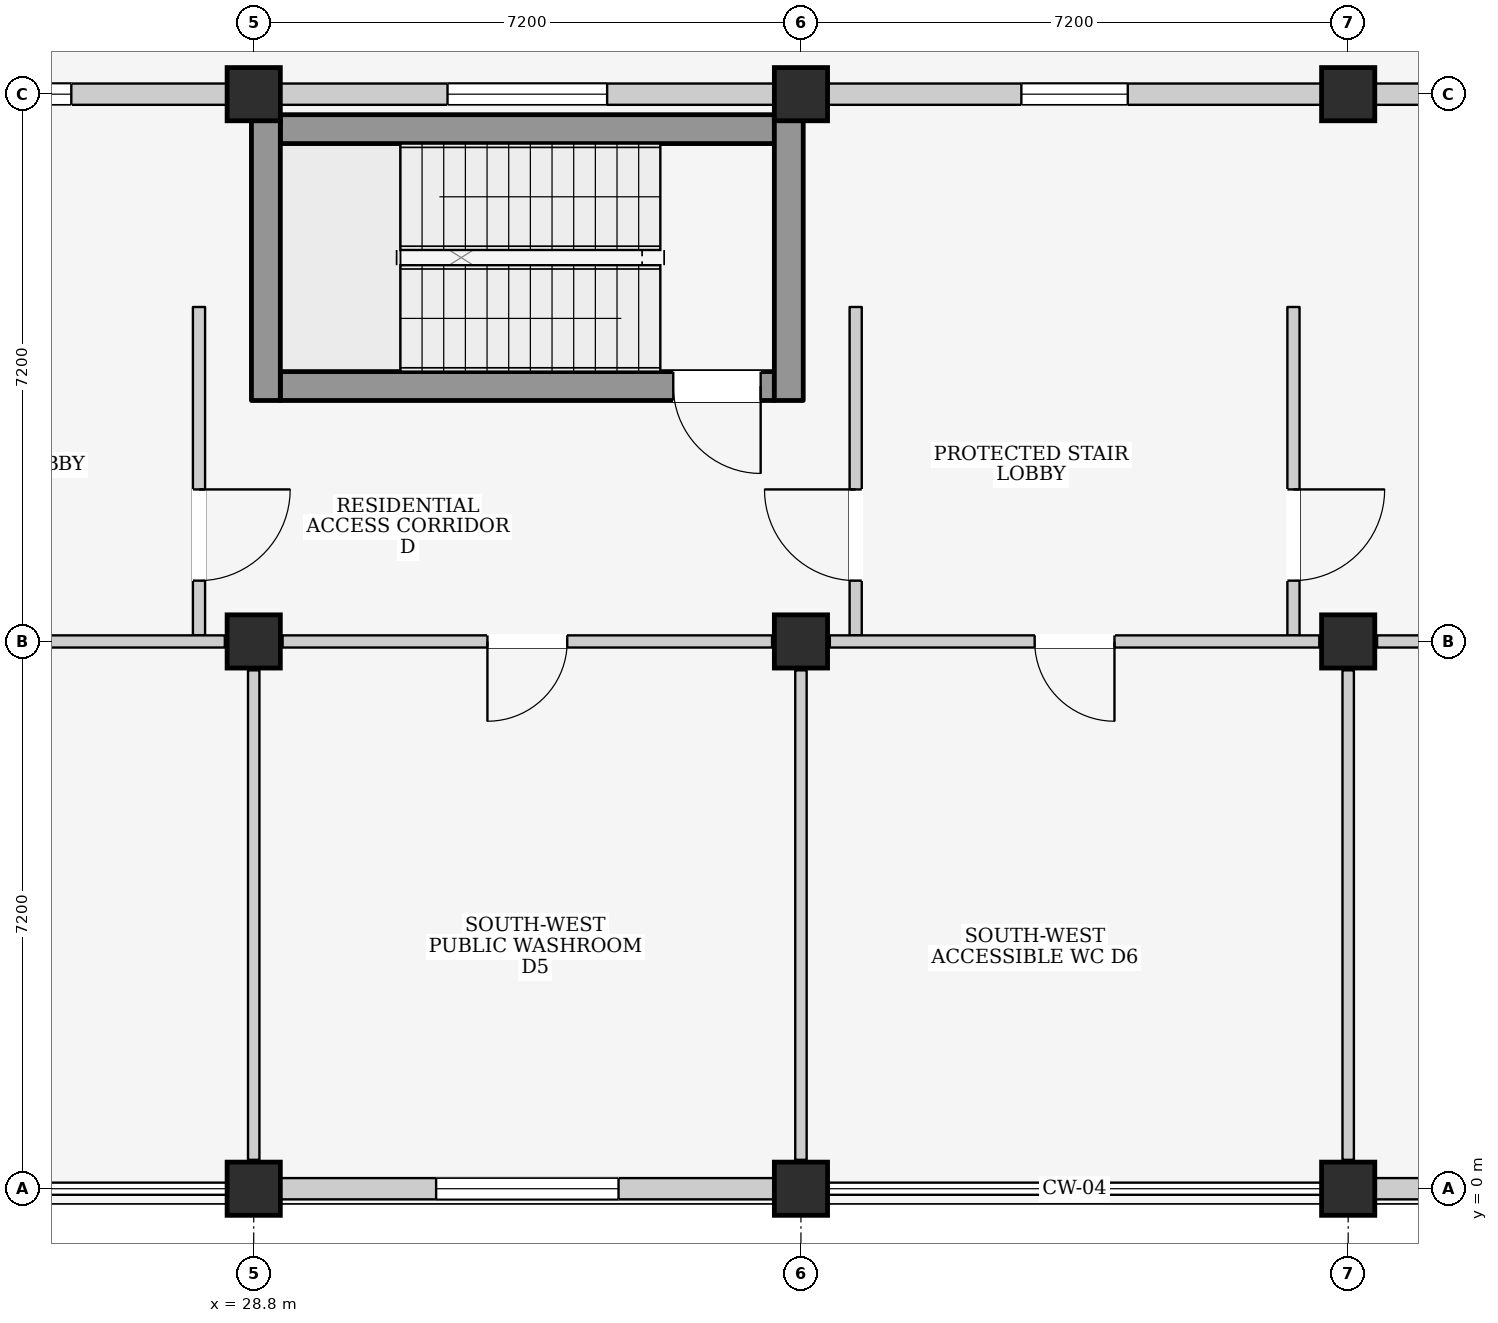
"""IFC4 building model, lengths in metres.
Left out: names, types, materials, properties, quantities, classifications, styles, units other than length and angle.
Written with IfcOpenShell. Run it as: python <this file> out.ifc"""

import sys

from ifc_helpers import new_model, si_unit, direction, frame, frame_2d, origin, origin_2d, place, context, subcontext, project, spatial, rectangle, extrude, element, fill, save


model = new_model("IFC4")
c1 = context("Model", 3, precision=1e-05, world=origin(), true_north=direction((0.0, 1.0)))
c2 = subcontext(c1, "Body", "Model", "MODEL_VIEW")
j1 = project(units=[si_unit("LENGTHUNIT", "METRE"), si_unit("PLANEANGLEUNIT", "RADIAN")], contexts=[c1])
p1 = place(None, origin())
s1 = spatial("IfcSite", under=j1, at=p1, CompositionType="ELEMENT")
p2 = place(p1, origin())
s2 = spatial("IfcBuilding", under=s1, at=p2, CompositionType="ELEMENT")
p3 = place(p2, origin())
s3 = spatial("IfcBuildingStorey", under=s2, at=p3, CompositionType="ELEMENT", Elevation=0.0)
for number, where, z_axis, x_axis in (
    (1, (28.8, 0.0, 0.0), (0.0, 0.0, 1.0), (1.0, 0.0, 0.0)),
    (2, (28.8, 7.2, 0.0), (0.0, 0.0, 1.0), (1.0, 0.0, 0.0)),
    (3, (28.8, 14.4, 0.0), (0.0, 0.0, 1.0), (1.0, 0.0, 0.0)),
    (4, (36.0, 0.0, 0.0), (0.0, 0.0, 1.0), (1.0, 0.0, 0.0)),
    (5, (36.0, 7.2, 0.0), (0.0, 0.0, 1.0), (1.0, 0.0, 0.0)),
    (6, (36.0, 14.4, 0.0), (0.0, 0.0, 1.0), (1.0, 0.0, 0.0)),
    (7, (43.2, 0.0, 0.0), (0.0, 0.0, 1.0), (1.0, 0.0, 0.0)),
    (8, (43.2, 7.2, 0.0), (0.0, 0.0, 1.0), (1.0, 0.0, 0.0)),
    (9, (43.2, 14.4, 0.0), (0.0, 0.0, 1.0), (1.0, 0.0, 0.0)),
):
    element("IfcColumn", number, at=place(p3, frame(where, z_axis=z_axis, x_axis=x_axis)), inside=s3, PredefinedType="COLUMN", context=c2, shape_type="SweptSolid", body=[
        extrude(rectangle(XDim=0.7, YDim=0.7, at=origin_2d()), origin(), (0.0, 0.0, 1.0), 4.5),
    ])
p4 = place(p3, frame((21.95, 14.4, 0.0), z_axis=(0.0, 0.0, 1.0), x_axis=(1.0, 0.0, 0.0)))
e10 = element("IfcWall", 10, at=p4, inside=s3, PredefinedType="ELEMENTEDWALL", context=c2, shape_type="SweptSolid", body=[
    extrude(rectangle(XDim=6.5, YDim=0.28, at=frame_2d((3.25, 0.0))), origin(), (0.0, 0.0, 1.0), 3.435),
])
p5 = place(p4, frame((2.05, 0.0, 0.95)))
e11 = element("IfcOpeningElement", 11, at=p5, cuts=e10, PredefinedType="OPENING", context=c2, shape_type="SweptSolid", body=[
    extrude(rectangle(XDim=2.4, YDim=1.65, at=frame_2d((1.2, 0.825))), frame((0.0, 0.155, 0.0), z_axis=(0.0, -1.0, 0.0), x_axis=(1.0, 0.0, 0.0)), (0.0, 0.0, 1.0), 0.31),
])
p6 = place(p3, frame((29.15, 0.0, 0.0), z_axis=(0.0, 0.0, 1.0), x_axis=(1.0, 0.0, 0.0)))
e12 = element("IfcWall", 12, at=p6, inside=s3, PredefinedType="ELEMENTEDWALL", context=c2, shape_type="SweptSolid", body=[
    extrude(rectangle(XDim=6.5, YDim=0.28, at=frame_2d((3.25, 0.0))), origin(), (0.0, 0.0, 1.0), 3.665),
])
p7 = place(p6, frame((2.05, 0.0, 0.95)))
e13 = element("IfcOpeningElement", 13, at=p7, cuts=e12, PredefinedType="OPENING", context=c2, shape_type="SweptSolid", body=[
    extrude(rectangle(XDim=2.4, YDim=1.65, at=frame_2d((1.2, 0.825))), frame((0.0, 0.155, 0.0), z_axis=(0.0, -1.0, 0.0), x_axis=(1.0, 0.0, 0.0)), (0.0, 0.0, 1.0), 0.31),
])
p8 = place(p3, frame((29.15, 14.4, 0.0), z_axis=(0.0, 0.0, 1.0), x_axis=(1.0, 0.0, 0.0)))
e14 = element("IfcWall", 14, at=p8, inside=s3, PredefinedType="ELEMENTEDWALL", context=c2, shape_type="SweptSolid", body=[
    extrude(rectangle(XDim=6.5, YDim=0.28, at=frame_2d((3.25, 0.0))), origin(), (0.0, 0.0, 1.0), 3.435),
])
p9 = place(p8, frame((2.2, 0.0, 0.95)))
e15 = element("IfcOpeningElement", 15, at=p9, cuts=e14, PredefinedType="OPENING", context=c2, shape_type="SweptSolid", body=[
    extrude(rectangle(XDim=2.1, YDim=1.65, at=frame_2d((1.05, 0.825))), frame((0.0, 0.155, 0.0), z_axis=(0.0, -1.0, 0.0), x_axis=(1.0, 0.0, 0.0)), (0.0, 0.0, 1.0), 0.31),
])
p10 = place(p3, frame((36.35, 14.4, 0.0), z_axis=(0.0, 0.0, 1.0), x_axis=(1.0, 0.0, 0.0)))
e16 = element("IfcWall", 16, at=p10, inside=s3, PredefinedType="ELEMENTEDWALL", context=c2, shape_type="SweptSolid", body=[
    extrude(rectangle(XDim=6.5, YDim=0.28, at=frame_2d((3.25, 0.0))), origin(), (0.0, 0.0, 1.0), 3.435),
])
p11 = place(p10, frame((2.55, 0.0, 0.95)))
e17 = element("IfcOpeningElement", 17, at=p11, cuts=e16, PredefinedType="OPENING", context=c2, shape_type="SweptSolid", body=[
    extrude(rectangle(XDim=1.4, YDim=1.2, at=frame_2d((0.7, 0.6))), frame((0.0, 0.155, 0.0), z_axis=(0.0, -1.0, 0.0), x_axis=(1.0, 0.0, 0.0)), (0.0, 0.0, 1.0), 0.31),
])
p12 = place(p3, frame((43.55, 0.0, 0.0), z_axis=(0.0, 0.0, 1.0), x_axis=(1.0, 0.0, 0.0)))
e18 = element("IfcWall", 18, at=p12, inside=s3, PredefinedType="ELEMENTEDWALL", context=c2, shape_type="SweptSolid", body=[
    extrude(rectangle(XDim=6.5, YDim=0.28, at=frame_2d((3.25, 0.0))), origin(), (0.0, 0.0, 1.0), 3.665),
])
p13 = place(p12, frame((1.2, 0.0, 0.0)))
e19 = element("IfcOpeningElement", 19, at=p13, cuts=e18, PredefinedType="OPENING", context=c2, shape_type="SweptSolid", body=[
    extrude(rectangle(XDim=1.1, YDim=2.2, at=frame_2d((0.55, 1.1))), frame((0.0, 0.155, 0.0), z_axis=(0.0, -1.0, 0.0), x_axis=(1.0, 0.0, 0.0)), (0.0, 0.0, 1.0), 0.31),
])
p14 = place(p12, frame((2.9, 0.0, 0.85)))
e20 = element("IfcOpeningElement", 20, at=p14, cuts=e18, PredefinedType="OPENING", context=c2, shape_type="SweptSolid", body=[
    extrude(rectangle(XDim=2.2, YDim=1.8, at=frame_2d((1.1, 0.9))), frame((0.0, 0.155, 0.0), z_axis=(0.0, -1.0, 0.0), x_axis=(1.0, 0.0, 0.0)), (0.0, 0.0, 1.0), 0.31),
])
p15 = place(p3, frame((43.55, 14.4, 0.0), z_axis=(0.0, 0.0, 1.0), x_axis=(1.0, 0.0, 0.0)))
e21 = element("IfcWall", 21, at=p15, inside=s3, PredefinedType="ELEMENTEDWALL", context=c2, shape_type="SweptSolid", body=[
    extrude(rectangle(XDim=6.5, YDim=0.28, at=frame_2d((3.25, 0.0))), origin(), (0.0, 0.0, 1.0), 3.435),
])
p16 = place(p15, frame((2.6, 0.0, 0.0)))
e22 = element("IfcOpeningElement", 22, at=p16, cuts=e21, PredefinedType="OPENING", context=c2, shape_type="SweptSolid", body=[
    extrude(rectangle(XDim=1.2, YDim=2.15, at=frame_2d((0.6, 1.075))), frame((0.0, 0.155, 0.0), z_axis=(0.0, -1.0, 0.0), x_axis=(1.0, 0.0, 0.0)), (0.0, 0.0, 1.0), 0.31),
])
p17 = place(p3, frame((28.08, 7.28, 0.0), z_axis=(0.0, 0.0, 1.0), x_axis=(0.0, 1.0, 0.0)))
e23 = element("IfcWall", 23, at=p17, inside=s3, PredefinedType="PARTITIONING", context=c2, shape_type="SweptSolid", body=[
    extrude(rectangle(XDim=4.32, YDim=0.16, at=frame_2d((2.16, 0.0))), origin(), (0.0, 0.0, 1.0), 4.2),
])
p18 = place(p17, frame((0.72, 0.0, 0.0)))
e24 = element("IfcOpeningElement", 24, at=p18, cuts=e23, PredefinedType="OPENING", context=c2, shape_type="SweptSolid", body=[
    extrude(rectangle(XDim=1.2, YDim=2.2, at=frame_2d((0.6, 1.1))), frame((0.0, 0.095, 0.0), z_axis=(0.0, -1.0, 0.0), x_axis=(1.0, 0.0, 0.0)), (0.0, 0.0, 1.0), 0.19),
])
p19 = place(p3, frame((29.15, 10.56, 0.0), z_axis=(0.0, 0.0, 1.0), x_axis=(1.0, 0.0, 0.0)))
e25 = element("IfcWall", 25, at=p19, inside=s3, PredefinedType="SHEAR", context=c2, shape_type="SweptSolid", body=[
    extrude(rectangle(XDim=6.5, YDim=0.38, at=frame_2d((3.25, 0.0))), origin(), (0.0, 0.0, 1.0), 4.2),
])
p20 = place(p19, frame((5.17, 0.0, 0.0)))
e26 = element("IfcOpeningElement", 26, at=p20, cuts=e25, PredefinedType="OPENING", context=c2, shape_type="SweptSolid", body=[
    extrude(rectangle(XDim=1.15, YDim=2.2, at=frame_2d((0.575, 1.1))), frame((0.0, 0.205, 0.0), z_axis=(0.0, -1.0, 0.0), x_axis=(1.0, 0.0, 0.0)), (0.0, 0.0, 1.0), 0.41),
])
p21 = place(p3, frame((29.15, 13.94, 0.0), z_axis=(0.0, 0.0, 1.0), x_axis=(1.0, 0.0, 0.0)))
e27 = element("IfcWall", 27, at=p21, inside=s3, PredefinedType="SHEAR", context=c2, shape_type="SweptSolid", body=[
    extrude(rectangle(XDim=6.5, YDim=0.38, at=frame_2d((3.25, 0.0))), origin(), (0.0, 0.0, 1.0), 4.2),
])
for number, where, z_axis, x_axis in (
    (28, (28.96, 10.37, 0.0), (0.0, 0.0, 1.0), (0.0, 1.0, 0.0)),
    (29, (35.84, 10.37, 0.0), (0.0, 0.0, 1.0), (0.0, 1.0, 0.0)),
):
    element("IfcWall", number, at=place(p3, frame(where, z_axis=z_axis, x_axis=x_axis)), inside=s3, PredefinedType="SHEAR", context=c2, shape_type="SweptSolid", body=[
        extrude(rectangle(XDim=3.76, YDim=0.38, at=frame_2d((1.88, 0.0))), origin(), (0.0, 0.0, 1.0), 4.2),
    ])
p22 = place(p3, frame((36.72, 7.28, 0.0), z_axis=(0.0, 0.0, 1.0), x_axis=(0.0, 1.0, 0.0)))
e30 = element("IfcWall", 30, at=p22, inside=s3, PredefinedType="PARTITIONING", context=c2, shape_type="SweptSolid", body=[
    extrude(rectangle(XDim=4.32, YDim=0.16, at=frame_2d((2.16, 0.0))), origin(), (0.0, 0.0, 1.0), 4.2),
])
p23 = place(p22, frame((0.72, 0.0, 0.0)))
e31 = element("IfcOpeningElement", 31, at=p23, cuts=e30, PredefinedType="OPENING", context=c2, shape_type="SweptSolid", body=[
    extrude(rectangle(XDim=1.2, YDim=2.2, at=frame_2d((0.6, 1.1))), frame((0.0, 0.095, 0.0), z_axis=(0.0, -1.0, 0.0), x_axis=(1.0, 0.0, 0.0)), (0.0, 0.0, 1.0), 0.19),
])
p24 = place(p3, frame((42.48, 7.28, 0.0), z_axis=(0.0, 0.0, 1.0), x_axis=(0.0, 1.0, 0.0)))
e32 = element("IfcWall", 32, at=p24, inside=s3, PredefinedType="PARTITIONING", context=c2, shape_type="SweptSolid", body=[
    extrude(rectangle(XDim=4.32, YDim=0.16, at=frame_2d((2.16, 0.0))), origin(), (0.0, 0.0, 1.0), 4.2),
])
p25 = place(p24, frame((0.72, 0.0, 0.0)))
e33 = element("IfcOpeningElement", 33, at=p25, cuts=e32, PredefinedType="OPENING", context=c2, shape_type="SweptSolid", body=[
    extrude(rectangle(XDim=1.2, YDim=2.2, at=frame_2d((0.6, 1.1))), frame((0.0, 0.095, 0.0), z_axis=(0.0, -1.0, 0.0), x_axis=(1.0, 0.0, 0.0)), (0.0, 0.0, 1.0), 0.19),
])
p26 = place(p3, frame((21.98, 7.2, 0.0), z_axis=(0.0, 0.0, 1.0), x_axis=(1.0, 0.0, 0.0)))
e34 = element("IfcWall", 34, at=p26, inside=s3, PredefinedType="PARTITIONING", context=c2, shape_type="SweptSolid", body=[
    extrude(rectangle(XDim=6.44, YDim=0.16, at=frame_2d((3.22, 0.0))), origin(), (0.0, 0.0, 1.0), 3.435),
])
p27 = place(p26, frame((2.66, 0.0, 0.0)))
e35 = element("IfcOpeningElement", 35, at=p27, cuts=e34, PredefinedType="OPENING", context=c2, shape_type="SweptSolid", body=[
    extrude(rectangle(XDim=1.12, YDim=2.2, at=frame_2d((0.56, 1.1))), frame((0.0, 0.095, 0.0), z_axis=(0.0, -1.0, 0.0), x_axis=(1.0, 0.0, 0.0)), (0.0, 0.0, 1.0), 0.19),
])
p28 = place(p3, frame((28.8, 0.38, 0.0), z_axis=(0.0, 0.0, 1.0), x_axis=(0.0, 1.0, 0.0)))
e36 = element("IfcWall", 36, at=p28, inside=s3, PredefinedType="PARTITIONING", context=c2, shape_type="SweptSolid", body=[
    extrude(rectangle(XDim=6.44, YDim=0.15, at=frame_2d((3.22, 0.0))), origin(), (0.0, 0.0, 1.0), 3.435),
])
p29 = place(p3, frame((29.18, 7.2, 0.0), z_axis=(0.0, 0.0, 1.0), x_axis=(1.0, 0.0, 0.0)))
e37 = element("IfcWall", 37, at=p29, inside=s3, PredefinedType="PARTITIONING", context=c2, shape_type="SweptSolid", body=[
    extrude(rectangle(XDim=6.44, YDim=0.16, at=frame_2d((3.22, 0.0))), origin(), (0.0, 0.0, 1.0), 3.435),
])
p30 = place(p29, frame((2.695, 0.0, 0.0)))
e38 = element("IfcOpeningElement", 38, at=p30, cuts=e37, PredefinedType="OPENING", context=c2, shape_type="SweptSolid", body=[
    extrude(rectangle(XDim=1.05, YDim=2.15, at=frame_2d((0.525, 1.075))), frame((0.0, 0.095, 0.0), z_axis=(0.0, -1.0, 0.0), x_axis=(1.0, 0.0, 0.0)), (0.0, 0.0, 1.0), 0.19),
])
p31 = place(p3, frame((36.0, 0.38, 0.0), z_axis=(0.0, 0.0, 1.0), x_axis=(0.0, 1.0, 0.0)))
e39 = element("IfcWall", 39, at=p31, inside=s3, PredefinedType="PARTITIONING", context=c2, shape_type="SweptSolid", body=[
    extrude(rectangle(XDim=6.44, YDim=0.15, at=frame_2d((3.22, 0.0))), origin(), (0.0, 0.0, 1.0), 3.435),
])
p32 = place(p3, frame((36.38, 7.2, 0.0), z_axis=(0.0, 0.0, 1.0), x_axis=(1.0, 0.0, 0.0)))
e40 = element("IfcWall", 40, at=p32, inside=s3, PredefinedType="PARTITIONING", context=c2, shape_type="SweptSolid", body=[
    extrude(rectangle(XDim=6.44, YDim=0.16, at=frame_2d((3.22, 0.0))), origin(), (0.0, 0.0, 1.0), 3.435),
])
p33 = place(p32, frame((2.695, 0.0, 0.0)))
e41 = element("IfcOpeningElement", 41, at=p33, cuts=e40, PredefinedType="OPENING", context=c2, shape_type="SweptSolid", body=[
    extrude(rectangle(XDim=1.05, YDim=2.15, at=frame_2d((0.525, 1.075))), frame((0.0, 0.095, 0.0), z_axis=(0.0, -1.0, 0.0), x_axis=(1.0, 0.0, 0.0)), (0.0, 0.0, 1.0), 0.19),
])
p34 = place(p3, frame((43.2, 0.38, 0.0), z_axis=(0.0, 0.0, 1.0), x_axis=(0.0, 1.0, 0.0)))
e42 = element("IfcWall", 42, at=p34, inside=s3, PredefinedType="PARTITIONING", context=c2, shape_type="SweptSolid", body=[
    extrude(rectangle(XDim=6.44, YDim=0.15, at=frame_2d((3.22, 0.0))), origin(), (0.0, 0.0, 1.0), 3.435),
])
p35 = place(p3, frame((43.58, 7.2, 0.0), z_axis=(0.0, 0.0, 1.0), x_axis=(1.0, 0.0, 0.0)))
e43 = element("IfcWall", 43, at=p35, inside=s3, PredefinedType="PARTITIONING", context=c2, shape_type="SweptSolid", body=[
    extrude(rectangle(XDim=6.44, YDim=0.16, at=frame_2d((3.22, 0.0))), origin(), (0.0, 0.0, 1.0), 3.435),
])
p36 = place(p35, frame((2.66, 0.0, 0.0)))
e44 = element("IfcOpeningElement", 44, at=p36, cuts=e43, PredefinedType="OPENING", context=c2, shape_type="SweptSolid", body=[
    extrude(rectangle(XDim=1.12, YDim=2.2, at=frame_2d((0.56, 1.1))), frame((0.0, 0.095, 0.0), z_axis=(0.0, -1.0, 0.0), x_axis=(1.0, 0.0, 0.0)), (0.0, 0.0, 1.0), 0.19),
])
p37 = place(p5, origin())
e45 = element("IfcWindow", 45, at=p37, inside=s3, PartitioningType="TRIPLE_PANEL_VERTICAL", PredefinedType="WINDOW", context=c2, shape_type="SweptSolid", body=[
    extrude(rectangle(XDim=2.4, YDim=1.65, at=frame_2d((1.2, 0.825))), frame((0.0, 0.03, 0.0), z_axis=(0.0, -1.0, 0.0), x_axis=(1.0, 0.0, 0.0)), (0.0, 0.0, 1.0), 0.06),
])
fill(e11, e45)
p38 = place(p7, origin())
e46 = element("IfcWindow", 46, at=p38, inside=s3, PartitioningType="TRIPLE_PANEL_VERTICAL", PredefinedType="WINDOW", context=c2, shape_type="SweptSolid", body=[
    extrude(rectangle(XDim=2.4, YDim=1.65, at=frame_2d((1.2, 0.825))), frame((0.0, 0.03, 0.0), z_axis=(0.0, -1.0, 0.0), x_axis=(1.0, 0.0, 0.0)), (0.0, 0.0, 1.0), 0.06),
])
fill(e13, e46)
p39 = place(p9, origin())
e47 = element("IfcWindow", 47, at=p39, inside=s3, PartitioningType="DOUBLE_PANEL_VERTICAL", PredefinedType="WINDOW", context=c2, shape_type="SweptSolid", body=[
    extrude(rectangle(XDim=2.1, YDim=1.65, at=frame_2d((1.05, 0.825))), frame((0.0, 0.03, 0.0), z_axis=(0.0, -1.0, 0.0), x_axis=(1.0, 0.0, 0.0)), (0.0, 0.0, 1.0), 0.06),
])
fill(e15, e47)
p40 = place(p11, origin())
e48 = element("IfcWindow", 48, at=p40, inside=s3, PartitioningType="DOUBLE_PANEL_HORIZONTAL", PredefinedType="WINDOW", context=c2, shape_type="SweptSolid", body=[
    extrude(rectangle(XDim=1.4, YDim=1.2, at=frame_2d((0.7, 0.6))), frame((0.0, 0.03, 0.0), z_axis=(0.0, -1.0, 0.0), x_axis=(1.0, 0.0, 0.0)), (0.0, 0.0, 1.0), 0.06),
])
fill(e17, e48)
p41 = place(p18, frame((1.2, 0.0, 0.0), z_axis=(0.0, 0.0, 1.0), x_axis=(-1.0, 0.0, 0.0)))
e49 = element("IfcDoor", 49, at=p41, inside=s3, OperationType="SINGLE_SWING_LEFT", PredefinedType="DOOR", context=c2, shape_type="SweptSolid", body=[
    extrude(rectangle(XDim=1.2, YDim=2.2, at=frame_2d((0.6, 1.1))), frame((0.0, 0.025, 0.0), z_axis=(0.0, -1.0, 0.0), x_axis=(1.0, 0.0, 0.0)), (0.0, 0.0, 1.0), 0.05),
])
fill(e24, e49)
p42 = place(p20, frame((1.15, 0.0, 0.0), z_axis=(0.0, 0.0, 1.0), x_axis=(-1.0, 0.0, 0.0)))
e50 = element("IfcDoor", 50, at=p42, inside=s3, OperationType="SINGLE_SWING_LEFT", PredefinedType="DOOR", context=c2, shape_type="SweptSolid", body=[
    extrude(rectangle(XDim=1.15, YDim=2.2, at=frame_2d((0.575, 1.1))), frame((0.0, 0.025, 0.0), z_axis=(0.0, -1.0, 0.0), x_axis=(1.0, 0.0, 0.0)), (0.0, 0.0, 1.0), 0.05),
])
fill(e26, e50)
p43 = place(p23, origin())
e51 = element("IfcDoor", 51, at=p43, inside=s3, OperationType="SINGLE_SWING_RIGHT", PredefinedType="DOOR", context=c2, shape_type="SweptSolid", body=[
    extrude(rectangle(XDim=1.2, YDim=2.2, at=frame_2d((0.6, 1.1))), frame((0.0, 0.025, 0.0), z_axis=(0.0, -1.0, 0.0), x_axis=(1.0, 0.0, 0.0)), (0.0, 0.0, 1.0), 0.05),
])
fill(e31, e51)
p44 = place(p25, frame((1.2, 0.0, 0.0), z_axis=(0.0, 0.0, 1.0), x_axis=(-1.0, 0.0, 0.0)))
e52 = element("IfcDoor", 52, at=p44, inside=s3, OperationType="SINGLE_SWING_LEFT", PredefinedType="DOOR", context=c2, shape_type="SweptSolid", body=[
    extrude(rectangle(XDim=1.2, YDim=2.2, at=frame_2d((0.6, 1.1))), frame((0.0, 0.025, 0.0), z_axis=(0.0, -1.0, 0.0), x_axis=(1.0, 0.0, 0.0)), (0.0, 0.0, 1.0), 0.05),
])
fill(e33, e52)
p45 = place(p30, frame((1.05, 0.0, 0.0), z_axis=(0.0, 0.0, 1.0), x_axis=(-1.0, 0.0, 0.0)))
e53 = element("IfcDoor", 53, at=p45, inside=s3, OperationType="SINGLE_SWING_RIGHT", PredefinedType="DOOR", context=c2, shape_type="SweptSolid", body=[
    extrude(rectangle(XDim=1.05, YDim=2.15, at=frame_2d((0.525, 1.075))), frame((0.0, 0.025, 0.0), z_axis=(0.0, -1.0, 0.0), x_axis=(1.0, 0.0, 0.0)), (0.0, 0.0, 1.0), 0.05),
])
fill(e38, e53)
p46 = place(p33, frame((1.05, 0.0, 0.0), z_axis=(0.0, 0.0, 1.0), x_axis=(-1.0, 0.0, 0.0)))
e54 = element("IfcDoor", 54, at=p46, inside=s3, OperationType="SINGLE_SWING_LEFT", PredefinedType="DOOR", context=c2, shape_type="SweptSolid", body=[
    extrude(rectangle(XDim=1.05, YDim=2.15, at=frame_2d((0.525, 1.075))), frame((0.0, 0.025, 0.0), z_axis=(0.0, -1.0, 0.0), x_axis=(1.0, 0.0, 0.0)), (0.0, 0.0, 1.0), 0.05),
])
fill(e41, e54)
save(model, sys.argv[1])
